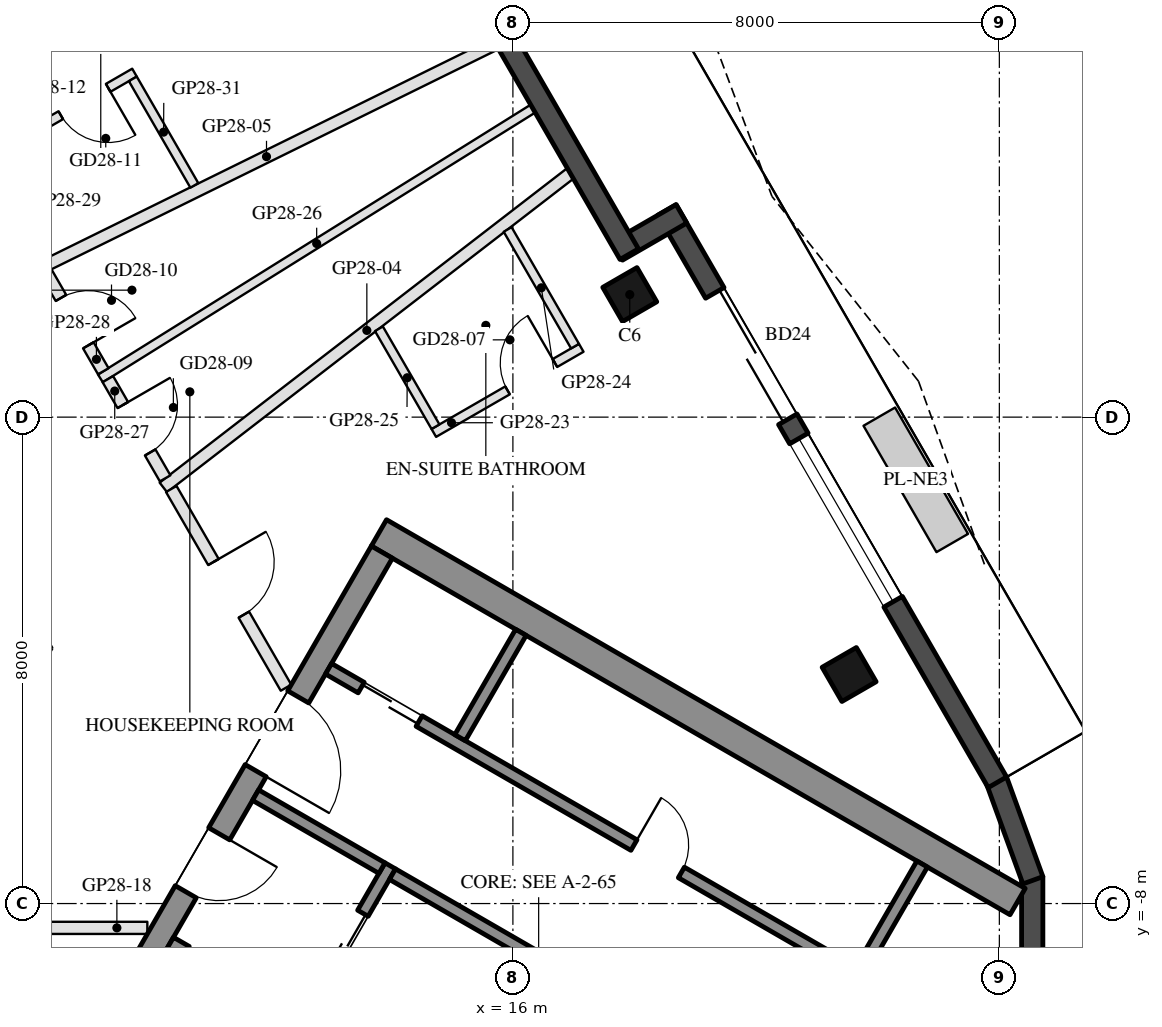
"""IFC4 building model, lengths in metres.
Left out: names, types, materials, properties, quantities, classifications, styles, units other than length and angle.
Written with IfcOpenShell. Run it as: python <this file> out.ifc"""

import sys

from ifc_helpers import new_model, si_unit, direction, frame, frame_2d, origin, origin_2d, place, context, subcontext, project, spatial, rectangle, hollow_rectangle, extrude, boolean, halfspace, element, fill, save


model = new_model("IFC4")
c1 = context("Model", 3, precision=1e-05, world=origin(), true_north=direction((0.0, 1.0)))
c2 = subcontext(c1, "Body", "Model", "MODEL_VIEW")
j1 = project(units=[si_unit("LENGTHUNIT", "METRE"), si_unit("PLANEANGLEUNIT", "RADIAN")], contexts=[c1])
p1 = place(None, origin())
s1 = spatial("IfcSite", under=j1, at=p1, CompositionType="ELEMENT")
p2 = place(p1, origin())
s2 = spatial("IfcBuilding", under=s1, at=p2, CompositionType="ELEMENT")
p3 = place(p2, frame((0.0, 0.0, 283.7)))
s3 = spatial("IfcBuildingStorey", under=s2, at=p3, CompositionType="ELEMENT", Elevation=283.7)
p4 = place(p3, frame((21.53, -4.233, 0.0), z_axis=(0.0, 0.0, 1.0), x_axis=(-0.5, 0.866025403784, 0.0)))
e1 = element("IfcColumn", 1, at=p4, inside=s3, PredefinedType="COLUMN", context=c2, shape_type="SweptSolid", body=[
    boolean("DIFFERENCE", extrude(hollow_rectangle(XDim=0.65, YDim=0.65, WallThickness=0.03, at=origin_2d()), origin(), (0.0, 0.0, 1.0), 3.7), halfspace(frame((0.0, 0.0, 3.653), z_axis=(0.0, 0.0, 1.0), x_axis=(1.0, 0.0, 0.0)), False)),
])
p5 = place(p3, frame((17.922, 2.016, 0.0), z_axis=(0.0, 0.0, 1.0), x_axis=(-0.5, 0.866025403784, 0.0)))
e2 = element("IfcColumn", 2, at=p5, inside=s3, PredefinedType="COLUMN", context=c2, shape_type="SweptSolid", body=[
    boolean("DIFFERENCE", extrude(hollow_rectangle(XDim=0.65, YDim=0.65, WallThickness=0.03, at=origin_2d()), origin(), (0.0, 0.0, 1.0), 3.7), halfspace(frame((0.0, 0.0, 3.66), z_axis=(0.0, 0.0, 1.0), x_axis=(1.0, 0.0, 0.0)), False)),
])
for number, where, z_axis, x_axis in (
    (3, (24.541, -9.302, 0.0), (0.0, 0.0, 1.0), (0.0, 1.0, 0.0)),
    (4, (24.552, -7.618, 0.0), (0.0, 0.0, 1.0), (-0.342, 0.94, 0.0)),
):
    element("IfcWall", number, at=place(p3, frame(where, z_axis=z_axis, x_axis=x_axis)), inside=s3, PredefinedType="SOLIDWALL", context=c2, shape_type="SweptSolid", body=[
        extrude(rectangle(XDim=1.745, YDim=0.35, at=frame_2d((0.872, 0.0))), origin(), (0.0, 0.0, 1.0), 3.55),
    ])
p6 = place(p3, frame((23.968, -6.006, 0.0), z_axis=(0.0, 0.0, 1.0), x_axis=(-0.500008899612, 0.86602026553, 0.0)))
e5 = element("IfcWall", 5, at=p6, inside=s3, PredefinedType="SOLIDWALL", context=c2, shape_type="SweptSolid", body=[
    extrude(rectangle(XDim=10.87, YDim=0.35, at=frame_2d((5.435, 0.0))), origin(), (0.0, 0.0, 1.0), 3.55),
])
p7 = place(p6, frame((6.894, 0.0, 0.0)))
e6 = element("IfcOpeningElement", 6, at=p7, cuts=e5, PredefinedType="OPENING", context=c2, shape_type="SweptSolid", body=[
    extrude(rectangle(XDim=2.4, YDim=2.4, at=frame_2d((1.2, 1.2))), frame((0.0, 0.185, 0.0), z_axis=(0.0, -1.0, 0.0), x_axis=(1.0, 0.0, 0.0)), (0.0, 0.0, 1.0), 0.37),
])
p8 = place(p6, frame((3.429, 0.0, 0.3)))
e7 = element("IfcOpeningElement", 7, at=p8, cuts=e5, PredefinedType="OPENING", context=c2, shape_type="SweptSolid", body=[
    extrude(rectangle(XDim=3.1, YDim=2.65, at=frame_2d((1.55, 1.325))), frame((0.0, 0.185, 0.0), z_axis=(0.0, -1.0, 0.0), x_axis=(1.0, 0.0, 0.0)), (0.0, 0.0, 1.0), 0.37),
])
p9 = place(p3, frame((18.772, 3.344, 0.0), z_axis=(0.0, 0.0, 1.0), x_axis=(-0.866005645448, -0.500034220881, 0.0)))
e8 = element("IfcWall", 8, at=p9, inside=s3, PredefinedType="SOLIDWALL", context=c2, shape_type="SweptSolid", body=[
    extrude(rectangle(XDim=1.22, YDim=0.35, at=frame_2d((0.61, 0.0))), origin(), (0.0, 0.0, 1.0), 3.55),
])
p10 = place(p3, frame((17.913, 2.68, 0.0), z_axis=(0.0, 0.0, 1.0), x_axis=(-0.499985371027, 0.866033849661, 0.0)))
e9 = element("IfcWall", 9, at=p10, inside=s3, PredefinedType="SOLIDWALL", context=c2, shape_type="SweptSolid", body=[
    extrude(rectangle(XDim=6.055, YDim=0.35, at=frame_2d((3.028, 0.0))), origin(), (0.0, 0.0, 1.0), 3.55),
])
p11 = place(p10, frame((4.59, 0.0, 0.0)))
e10 = element("IfcOpeningElement", 10, at=p11, cuts=e9, PredefinedType="OPENING", context=c2, shape_type="SweptSolid", body=[
    extrude(rectangle(XDim=1.1, YDim=2.4, at=frame_2d((0.55, 1.2))), frame((0.0, 0.185, 0.0), z_axis=(0.0, -1.0, 0.0), x_axis=(1.0, 0.0, 0.0)), (0.0, 0.0, 1.0), 0.37),
])
p12 = place(p3, frame((13.797, -1.903, 0.0), z_axis=(0.0, 0.0, 1.0), x_axis=(0.866024688907, -0.500001238203, 0.0)))
e11 = element("IfcWall", 11, at=p12, inside=s3, PredefinedType="SHEAR", context=c2, shape_type="SweptSolid", body=[
    extrude(rectangle(XDim=12.129, YDim=0.5, at=frame_2d((6.064, 0.0))), origin(), (0.0, 0.0, 1.0), 3.5),
])
p13 = place(p3, frame((8.845, -10.88, 0.0), z_axis=(0.0, 0.0, 1.0), x_axis=(0.500004234368, 0.866022959057, 0.0)))
e12 = element("IfcWall", 12, at=p13, inside=s3, PredefinedType="SHEAR", context=c2, shape_type="SweptSolid", body=[
    extrude(rectangle(XDim=10.0, YDim=0.4, at=frame_2d((5.0, 0.0))), origin(), (0.0, 0.0, 1.0), 3.5),
])
p14 = place(p13, frame((3.55, 0.0, 0.0)))
e13 = element("IfcOpeningElement", 13, at=p14, cuts=e12, PredefinedType="OPENING", context=c2, shape_type="SweptSolid", body=[
    extrude(rectangle(XDim=1.1, YDim=2.1, at=frame_2d((0.55, 1.05))), frame((0.0, 0.21, 0.0), z_axis=(0.0, -1.0, 0.0), x_axis=(1.0, 0.0, 0.0)), (0.0, 0.0, 1.0), 0.42),
])
p15 = place(p13, frame((5.85, 0.0, 0.0)))
e14 = element("IfcOpeningElement", 14, at=p15, cuts=e12, PredefinedType="OPENING", context=c2, shape_type="SweptSolid", body=[
    extrude(rectangle(XDim=1.4, YDim=2.1, at=frame_2d((0.7, 1.05))), frame((0.0, 0.21, 0.0), z_axis=(0.0, -1.0, 0.0), x_axis=(1.0, 0.0, 0.0)), (0.0, 0.0, 1.0), 0.42),
])
p16 = place(p3, frame((10.356, -8.664, 0.0), z_axis=(0.0, 0.0, 1.0), x_axis=(0.866028629588, -0.499994412703, 0.0)))
e15 = element("IfcWall", 15, at=p16, inside=s3, PredefinedType="SHEAR", context=c2, shape_type="SweptSolid", body=[
    extrude(rectangle(XDim=6.45, YDim=0.25, at=frame_2d((3.225, 0.0))), origin(), (0.0, 0.0, 1.0), 3.5),
])
p17 = place(p16, frame((0.3, 0.0, 0.0)))
e16 = element("IfcOpeningElement", 16, at=p17, cuts=e15, PredefinedType="OPENING", context=c2, shape_type="SweptSolid", body=[
    extrude(rectangle(XDim=1.0, YDim=2.1, at=frame_2d((0.5, 1.05))), frame((0.0, 0.135, 0.0), z_axis=(0.0, -1.0, 0.0), x_axis=(1.0, 0.0, 0.0)), (0.0, 0.0, 1.0), 0.27),
])
p18 = place(p3, frame((12.583, -9.805, 0.0), z_axis=(0.0, 0.0, 1.0), x_axis=(0.49994636267, 0.866056369097, 0.0)))
e17 = element("IfcWall", 17, at=p18, inside=s3, PredefinedType="SHEAR", context=c2, shape_type="SweptSolid", body=[
    extrude(rectangle(XDim=2.8, YDim=0.2, at=frame_2d((1.4, 0.0))), origin(), (0.0, 0.0, 1.0), 3.5),
])
p19 = place(p18, frame((0.7, 0.0, 0.0)))
e18 = element("IfcOpeningElement", 18, at=p19, cuts=e17, PredefinedType="OPENING", context=c2, shape_type="SweptSolid", body=[
    extrude(rectangle(XDim=1.2, YDim=2.1, at=frame_2d((0.6, 1.05))), frame((0.0, 0.11, 0.0), z_axis=(0.0, -1.0, 0.0), x_axis=(1.0, 0.0, 0.0)), (0.0, 0.0, 1.0), 0.22),
])
p20 = place(p3, frame((11.768, -6.217, 0.0), z_axis=(0.0, 0.0, 1.0), x_axis=(0.866050077142, -0.499957262057, 0.0)))
e19 = element("IfcWall", 19, at=p20, inside=s3, PredefinedType="SHEAR", context=c2, shape_type="SweptSolid", body=[
    extrude(rectangle(XDim=2.4, YDim=0.2, at=frame_2d((1.2, 0.0))), origin(), (0.0, 0.0, 1.0), 3.5),
])
p21 = place(p3, frame((14.02, -7.517, 0.0), z_axis=(0.0, 0.0, 1.0), x_axis=(0.866034573852, -0.49998411664, 0.0)))
e20 = element("IfcWall", 20, at=p21, inside=s3, PredefinedType="SHEAR", context=c2, shape_type="SweptSolid", body=[
    extrude(rectangle(XDim=2.8, YDim=0.2, at=frame_2d((1.4, 0.0))), origin(), (0.0, 0.0, 1.0), 3.5),
])
p22 = place(p3, frame((12.968, -4.138, 0.0), z_axis=(0.0, 0.0, 1.0), x_axis=(0.866028328073, -0.49999493495, 0.0)))
e21 = element("IfcWall", 21, at=p22, inside=s3, PredefinedType="SHEAR", context=c2, shape_type="SweptSolid", body=[
    extrude(rectangle(XDim=10.16, YDim=0.2, at=frame_2d((5.08, 0.0))), origin(), (0.0, 0.0, 1.0), 3.5),
])
p23 = place(p22, frame((0.62, 0.0, 0.0)))
e22 = element("IfcOpeningElement", 22, at=p23, cuts=e21, PredefinedType="OPENING", context=c2, shape_type="SweptSolid", body=[
    extrude(rectangle(XDim=1.1, YDim=2.1, at=frame_2d((0.55, 1.05))), frame((0.0, 0.11, 0.0), z_axis=(0.0, -1.0, 0.0), x_axis=(1.0, 0.0, 0.0)), (0.0, 0.0, 1.0), 0.22),
])
p24 = place(p22, frame((5.8, 0.0, 0.0)))
e23 = element("IfcOpeningElement", 23, at=p24, cuts=e21, PredefinedType="OPENING", context=c2, shape_type="SweptSolid", body=[
    extrude(rectangle(XDim=0.9, YDim=2.1, at=frame_2d((0.45, 1.05))), frame((0.0, 0.11, 0.0), z_axis=(0.0, -1.0, 0.0), x_axis=(1.0, 0.0, 0.0)), (0.0, 0.0, 1.0), 0.22),
])
for number, where, z_axis, x_axis in (
    (24, (15.131, -5.272, 0.0), (0.0, 0.0, 1.0), (0.5, 0.866, 0.0)),
    (25, (21.73, -9.082, 0.0), (0.0, 0.0, 1.0), (0.5, 0.866, 0.0)),
):
    element("IfcWall", number, at=place(p3, frame(where, z_axis=z_axis, x_axis=x_axis)), inside=s3, PredefinedType="SHEAR", context=c2, shape_type="SweptSolid", body=[
        extrude(rectangle(XDim=2.0, YDim=0.2, at=frame_2d((1.0, 0.0))), origin(), (0.0, 0.0, 1.0), 3.5),
    ])
p25 = place(p3, frame((16.945, 4.008, 0.0), z_axis=(0.0, 0.0, 1.0), x_axis=(-0.791722394734, -0.610881043801, 0.0)))
e26 = element("IfcWall", 26, at=p25, inside=s3, PredefinedType="PARTITIONING", context=c2, shape_type="SweptSolid", body=[
    extrude(rectangle(XDim=8.454, YDim=0.2, at=frame_2d((4.227, 0.0))), origin(), (0.0, 0.0, 1.0), 3.1),
])
p26 = place(p3, frame((15.715, 6.139, 0.0), z_axis=(0.0, 0.0, 1.0), x_axis=(-0.897120508699, -0.44178591294, 0.0)))
e27 = element("IfcWall", 27, at=p26, inside=s3, PredefinedType="PARTITIONING", context=c2, shape_type="SweptSolid", body=[
    extrude(rectangle(XDim=8.397, YDim=0.2, at=frame_2d((4.198, 0.0))), origin(), (0.0, 0.0, 1.0), 3.1),
])
p27 = place(p3, frame((14.224, 10.521, 0.0), z_axis=(0.0, 0.0, 1.0), x_axis=(-0.866024341471, -0.500001839976, 0.0)))
e28 = element("IfcWall", 28, at=p27, inside=s3, PredefinedType="PARTITIONING", context=c2, shape_type="SweptSolid", body=[
    extrude(rectangle(XDim=9.279, YDim=0.2, at=frame_2d((4.639, 0.0))), origin(), (0.0, 0.0, 1.0), 3.1),
])
p28 = place(p3, frame((9.988, -8.4, 0.0), z_axis=(0.0, 0.0, 1.0), x_axis=(-1.0, 0.0, 0.0)))
e29 = element("IfcWall", 29, at=p28, inside=s3, PredefinedType="PARTITIONING", context=c2, shape_type="SweptSolid", body=[
    extrude(rectangle(XDim=4.175, YDim=0.2, at=frame_2d((2.087, 0.0))), origin(), (0.0, 0.0, 1.0), 3.05),
])
p29 = place(p28, frame((1.587, 0.0, 0.0)))
e30 = element("IfcOpeningElement", 30, at=p29, cuts=e29, PredefinedType="OPENING", context=c2, shape_type="SweptSolid", body=[
    extrude(rectangle(XDim=1.0, YDim=2.1, at=frame_2d((0.5, 1.05))), frame((0.0, 0.11, 0.0), z_axis=(0.0, -1.0, 0.0), x_axis=(1.0, 0.0, 0.0)), (0.0, 0.0, 1.0), 0.22),
])
p30 = place(p3, frame((10.382, -1.182, 0.0), z_axis=(0.0, 0.0, 1.0), x_axis=(0.50002859319, -0.866008894869, 0.0)))
e31 = element("IfcWall", 31, at=p30, inside=s3, PredefinedType="PARTITIONING", context=c2, shape_type="SweptSolid", body=[
    extrude(rectangle(XDim=3.774, YDim=0.2, at=frame_2d((1.887, 0.0))), origin(), (0.0, 0.0, 1.0), 3.05),
])
p31 = place(p30, frame((1.387, 0.0, 0.0)))
e32 = element("IfcOpeningElement", 32, at=p31, cuts=e31, PredefinedType="OPENING", context=c2, shape_type="SweptSolid", body=[
    extrude(rectangle(XDim=1.0, YDim=2.1, at=frame_2d((0.5, 1.05))), frame((0.0, 0.11, 0.0), z_axis=(0.0, -1.0, 0.0), x_axis=(1.0, 0.0, 0.0)), (0.0, 0.0, 1.0), 0.22),
])
p32 = place(p3, frame((14.699, -0.26, 0.0), z_axis=(0.0, 0.0, 1.0), x_axis=(0.866034573852, 0.49998411664, 0.0)))
e33 = element("IfcWall", 33, at=p32, inside=s3, PredefinedType="PARTITIONING", context=c2, shape_type="SweptSolid", body=[
    extrude(rectangle(XDim=2.8, YDim=0.15, at=frame_2d((1.4, 0.0))), origin(), (0.0, 0.0, 1.0), 3.55),
])
p33 = place(p32, frame((1.4, 0.0, 0.0)))
e34 = element("IfcOpeningElement", 34, at=p33, cuts=e33, PredefinedType="OPENING", context=c2, shape_type="SweptSolid", body=[
    extrude(rectangle(XDim=0.9, YDim=2.1, at=frame_2d((0.45, 1.05))), frame((0.0, 0.085, 0.0), z_axis=(0.0, -1.0, 0.0), x_axis=(1.0, 0.0, 0.0)), (0.0, 0.0, 1.0), 0.17),
])
p34 = place(p3, frame((17.022, 1.167, 0.0), z_axis=(0.0, 0.0, 1.0), x_axis=(-0.499954515395, 0.866051662741, 0.0)))
e35 = element("IfcWall", 35, at=p34, inside=s3, PredefinedType="PARTITIONING", context=c2, shape_type="SweptSolid", body=[
    extrude(rectangle(XDim=2.216, YDim=0.15, at=frame_2d((1.108, 0.0))), origin(), (0.0, 0.0, 1.0), 3.05),
])
p35 = place(p3, frame((14.727, -0.158, 0.0), z_axis=(0.0, 0.0, 1.0), x_axis=(-0.499964847546, 0.866045698112, 0.0)))
e36 = element("IfcWall", 36, at=p35, inside=s3, PredefinedType="PARTITIONING", context=c2, shape_type="SweptSolid", body=[
    extrude(rectangle(XDim=1.86, YDim=0.15, at=frame_2d((0.93, 0.0))), origin(), (0.0, 0.0, 1.0), 3.05),
])
p36 = place(p3, frame((16.33, 5.074, 0.0), z_axis=(0.0, 0.0, 1.0), x_axis=(-0.848469139967, -0.52924485687, 0.0)))
e37 = element("IfcWall", 37, at=p36, inside=s3, PredefinedType="PARTITIONING", context=c2, shape_type="SweptSolid", body=[
    extrude(rectangle(XDim=8.384, YDim=0.15, at=frame_2d((4.192, 0.0))), origin(), (0.0, 0.0, 1.0), 3.1),
])
p37 = place(p3, frame((9.339, 0.625, 0.0), z_axis=(0.0, 0.0, 1.0), x_axis=(0.499999106059, -0.866025919901, 0.0)))
e38 = element("IfcWall", 38, at=p37, inside=s3, PredefinedType="PARTITIONING", context=c2, shape_type="SweptSolid", body=[
    extrude(rectangle(XDim=1.884, YDim=0.2, at=frame_2d((0.942, 0.0))), origin(), (0.0, 0.0, 1.0), 3.55),
])
p38 = place(p37, frame((0.492, 0.0, 0.0)))
e39 = element("IfcOpeningElement", 39, at=p38, cuts=e38, PredefinedType="OPENING", context=c2, shape_type="SweptSolid", body=[
    extrude(rectangle(XDim=0.9, YDim=2.1, at=frame_2d((0.45, 1.05))), frame((0.0, 0.11, 0.0), z_axis=(0.0, -1.0, 0.0), x_axis=(1.0, 0.0, 0.0)), (0.0, 0.0, 1.0), 0.22),
])
p39 = place(p3, frame((8.321, 2.387, 0.0), z_axis=(0.0, 0.0, 1.0), x_axis=(0.500081217305, -0.865978507874, 0.0)))
e40 = element("IfcWall", 40, at=p39, inside=s3, PredefinedType="PARTITIONING", context=c2, shape_type="SweptSolid", body=[
    extrude(rectangle(XDim=1.885, YDim=0.2, at=frame_2d((0.942, 0.0))), origin(), (0.0, 0.0, 1.0), 3.05),
])
p40 = place(p39, frame((0.492, 0.0, 0.0)))
e41 = element("IfcOpeningElement", 41, at=p40, cuts=e40, PredefinedType="OPENING", context=c2, shape_type="SweptSolid", body=[
    extrude(rectangle(XDim=0.9, YDim=2.1, at=frame_2d((0.45, 1.05))), frame((0.0, 0.11, 0.0), z_axis=(0.0, -1.0, 0.0), x_axis=(1.0, 0.0, 0.0)), (0.0, 0.0, 1.0), 0.22),
])
p41 = place(p3, frame((9.777, 5.666, 0.0), z_axis=(0.0, 0.0, 1.0), x_axis=(-0.865996816683, -0.500049511043, 0.0)))
e42 = element("IfcWall", 42, at=p41, inside=s3, PredefinedType="PARTITIONING", context=c2, shape_type="SweptSolid", body=[
    extrude(rectangle(XDim=2.8, YDim=0.15, at=frame_2d((1.4, 0.0))), origin(), (0.0, 0.0, 1.0), 3.05),
])
p42 = place(p41, frame((0.5, 0.0, 0.0)))
e43 = element("IfcOpeningElement", 43, at=p42, cuts=e42, PredefinedType="OPENING", context=c2, shape_type="SweptSolid", body=[
    extrude(rectangle(XDim=0.9, YDim=2.1, at=frame_2d((0.45, 1.05))), frame((0.0, 0.085, 0.0), z_axis=(0.0, -1.0, 0.0), x_axis=(1.0, 0.0, 0.0)), (0.0, 0.0, 1.0), 0.17),
])
p43 = place(p3, frame((10.761, 3.811, 0.0), z_axis=(0.0, 0.0, 1.0), x_axis=(-0.499941815747, 0.866058993873, 0.0)))
e44 = element("IfcWall", 44, at=p43, inside=s3, PredefinedType="PARTITIONING", context=c2, shape_type="SweptSolid", body=[
    extrude(rectangle(XDim=2.023, YDim=0.15, at=frame_2d((1.012, 0.0))), origin(), (0.0, 0.0, 1.0), 3.05),
])
p44 = place(p7, frame((2.4, 0.0, 0.0), z_axis=(0.0, 0.0, 1.0), x_axis=(-1.0, 0.0, 0.0)))
e45 = element("IfcDoor", 45, at=p44, inside=s3, OperationType="SLIDING_TO_LEFT", PredefinedType="DOOR", context=c2, shape_type="SweptSolid", body=[
    extrude(rectangle(XDim=2.4, YDim=2.4, at=frame_2d((1.2, 1.2))), frame((0.0, 0.025, 0.0), z_axis=(0.0, -1.0, 0.0), x_axis=(1.0, 0.0, 0.0)), (0.0, 0.0, 1.0), 0.05),
])
fill(e6, e45)
p45 = place(p8, origin())
e46 = element("IfcWindow", 46, at=p45, inside=s3, PartitioningType="SINGLE_PANEL", PredefinedType="WINDOW", context=c2, shape_type="SweptSolid", body=[
    extrude(rectangle(XDim=3.1, YDim=2.65, at=frame_2d((1.55, 1.325))), frame((0.0, 0.03, 0.0), z_axis=(0.0, -1.0, 0.0), x_axis=(1.0, 0.0, 0.0)), (0.0, 0.0, 1.0), 0.06),
])
fill(e7, e46)
p46 = place(p19, origin())
e47 = element("IfcDoor", 47, at=p46, inside=s3, OperationType="DOUBLE_DOOR_SLIDING", PredefinedType="DOOR", context=c2, shape_type="SweptSolid", body=[
    extrude(rectangle(XDim=1.2, YDim=2.1, at=frame_2d((0.6, 1.05))), frame((0.0, 0.025, 0.0), z_axis=(0.0, -1.0, 0.0), x_axis=(1.0, 0.0, 0.0)), (0.0, 0.0, 1.0), 0.05),
])
fill(e18, e47)
p47 = place(p23, origin())
e48 = element("IfcDoor", 48, at=p47, inside=s3, OperationType="DOUBLE_DOOR_SLIDING", PredefinedType="DOOR", context=c2, shape_type="SweptSolid", body=[
    extrude(rectangle(XDim=1.1, YDim=2.1, at=frame_2d((0.55, 1.05))), frame((0.0, 0.025, 0.0), z_axis=(0.0, -1.0, 0.0), x_axis=(1.0, 0.0, 0.0)), (0.0, 0.0, 1.0), 0.05),
])
fill(e22, e48)
p48 = place(p24, origin())
e49 = element("IfcDoor", 49, at=p48, inside=s3, OperationType="SINGLE_SWING_LEFT", PredefinedType="DOOR", context=c2, shape_type="SweptSolid", body=[
    extrude(rectangle(XDim=0.9, YDim=2.1, at=frame_2d((0.45, 1.05))), frame((0.0, 0.025, 0.0), z_axis=(0.0, -1.0, 0.0), x_axis=(1.0, 0.0, 0.0)), (0.0, 0.0, 1.0), 0.05),
])
fill(e23, e49)
p49 = place(p14, frame((1.1, 0.0, 0.0), z_axis=(0.0, 0.0, 1.0), x_axis=(-1.0, 0.0, 0.0)))
e50 = element("IfcDoor", 50, at=p49, inside=s3, OperationType="SINGLE_SWING_LEFT", PredefinedType="DOOR", context=c2, shape_type="SweptSolid", body=[
    extrude(rectangle(XDim=1.1, YDim=2.1, at=frame_2d((0.55, 1.05))), frame((0.0, 0.025, 0.0), z_axis=(0.0, -1.0, 0.0), x_axis=(1.0, 0.0, 0.0)), (0.0, 0.0, 1.0), 0.05),
])
fill(e13, e50)
p50 = place(p15, frame((1.4, 0.0, 0.0), z_axis=(0.0, 0.0, 1.0), x_axis=(-1.0, 0.0, 0.0)))
e51 = element("IfcDoor", 51, at=p50, inside=s3, OperationType="DOUBLE_DOOR_SINGLE_SWING", PredefinedType="DOOR", context=c2, shape_type="SweptSolid", body=[
    extrude(rectangle(XDim=1.4, YDim=2.1, at=frame_2d((0.7, 1.05))), frame((0.0, 0.025, 0.0), z_axis=(0.0, -1.0, 0.0), x_axis=(1.0, 0.0, 0.0)), (0.0, 0.0, 1.0), 0.05),
])
fill(e14, e51)
p51 = place(p33, origin())
e52 = element("IfcDoor", 52, at=p51, inside=s3, OperationType="SINGLE_SWING_RIGHT", PredefinedType="DOOR", context=c2, shape_type="SweptSolid", body=[
    extrude(rectangle(XDim=0.9, YDim=2.1, at=frame_2d((0.45, 1.05))), frame((0.0, 0.025, 0.0), z_axis=(0.0, -1.0, 0.0), x_axis=(1.0, 0.0, 0.0)), (0.0, 0.0, 1.0), 0.05),
])
fill(e34, e52)
p52 = place(p31, origin())
e53 = element("IfcDoor", 53, at=p52, inside=s3, OperationType="SINGLE_SWING_LEFT", PredefinedType="DOOR", context=c2, shape_type="SweptSolid", body=[
    extrude(rectangle(XDim=1.0, YDim=2.1, at=frame_2d((0.5, 1.05))), frame((0.0, 0.025, 0.0), z_axis=(0.0, -1.0, 0.0), x_axis=(1.0, 0.0, 0.0)), (0.0, 0.0, 1.0), 0.05),
])
fill(e32, e53)
p53 = place(p38, origin())
e54 = element("IfcDoor", 54, at=p53, inside=s3, OperationType="SINGLE_SWING_LEFT", PredefinedType="DOOR", context=c2, shape_type="SweptSolid", body=[
    extrude(rectangle(XDim=0.9, YDim=2.1, at=frame_2d((0.45, 1.05))), frame((0.0, 0.025, 0.0), z_axis=(0.0, -1.0, 0.0), x_axis=(1.0, 0.0, 0.0)), (0.0, 0.0, 1.0), 0.05),
])
fill(e39, e54)
p54 = place(p40, origin())
e55 = element("IfcDoor", 55, at=p54, inside=s3, OperationType="SINGLE_SWING_RIGHT", PredefinedType="DOOR", context=c2, shape_type="SweptSolid", body=[
    extrude(rectangle(XDim=0.9, YDim=2.1, at=frame_2d((0.45, 1.05))), frame((0.0, 0.025, 0.0), z_axis=(0.0, -1.0, 0.0), x_axis=(1.0, 0.0, 0.0)), (0.0, 0.0, 1.0), 0.05),
])
fill(e41, e55)
p55 = place(p42, origin())
e56 = element("IfcDoor", 56, at=p55, inside=s3, OperationType="SINGLE_SWING_LEFT", PredefinedType="DOOR", context=c2, shape_type="SweptSolid", body=[
    extrude(rectangle(XDim=0.9, YDim=2.1, at=frame_2d((0.45, 1.05))), frame((0.0, 0.025, 0.0), z_axis=(0.0, -1.0, 0.0), x_axis=(1.0, 0.0, 0.0)), (0.0, 0.0, 1.0), 0.05),
])
fill(e43, e56)
save(model, sys.argv[1])
